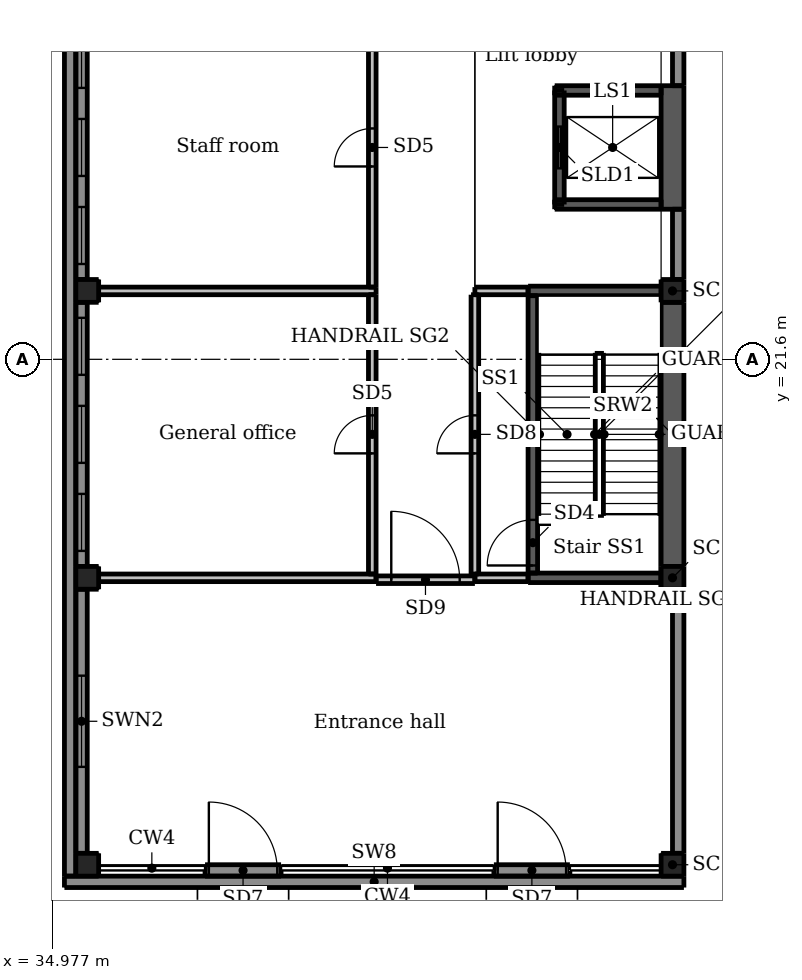
"""IFC4 building model, lengths in metres.
Left out: names, types, materials, properties, quantities, classifications, styles, units other than length and angle.
Written with IfcOpenShell. Run it as: python <this file> out.ifc"""

import sys

from ifc_helpers import new_model, si_unit, direction, frame, frame_2d, origin, origin_2d, place, context, subcontext, project, spatial, rectangle, extrude, element, fill, save


model = new_model("IFC4")
c1 = context("Model", 3, precision=1e-05, world=origin(), true_north=direction((0.0, 1.0)))
c2 = subcontext(c1, "Body", "Model", "MODEL_VIEW")
j1 = project(units=[si_unit("LENGTHUNIT", "METRE"), si_unit("PLANEANGLEUNIT", "RADIAN")], contexts=[c1])
p1 = place(None, origin())
s1 = spatial("IfcSite", under=j1, at=p1, CompositionType="ELEMENT")
p2 = place(p1, origin())
s2 = spatial("IfcBuilding", under=s1, at=p2, CompositionType="ELEMENT")
p3 = place(p2, origin())
s3 = spatial("IfcBuildingStorey", under=s2, at=p3, CompositionType="ELEMENT", Elevation=0.0)
p4 = place(p3, frame((52.0, 20.25, -2.5), z_axis=(0.0, 0.0, 1.0), x_axis=(1.0, 0.0, 0.0)))
e1 = element("IfcWall", 1, at=p4, inside=s3, PredefinedType="SOLIDWALL", context=c2, shape_type="SweptSolid", body=[
    extrude(rectangle(XDim=7.0, YDim=0.5, at=frame_2d((3.5, 0.0))), origin(), (0.0, 0.0, 1.0), 2.2),
])
for number, where, z_axis, x_axis in (
    (2, (35.9, 8.3, -0.3), (0.0, 0.0, 1.0), (1.0, 0.0, 0.0)),
    (3, (51.3, 8.3, -0.3), (0.0, 0.0, 1.0), (1.0, 0.0, 0.0)),
    (4, (35.9, 15.85, -0.3), (0.0, 0.0, 1.0), (1.0, 0.0, 0.0)),
    (5, (51.3, 15.85, -0.3), (0.0, 0.0, 1.0), (1.0, 0.0, 0.0)),
    (6, (35.9, 23.4, -0.3), (0.0, 0.0, 1.0), (1.0, 0.0, 0.0)),
    (7, (51.3, 23.4, -0.3), (0.0, 0.0, 1.0), (1.0, 0.0, 0.0)),
):
    element("IfcColumn", number, at=place(p3, frame(where, z_axis=z_axis, x_axis=x_axis)), inside=s3, PredefinedType="COLUMN", context=c2, shape_type="SweptSolid", body=[
        extrude(rectangle(XDim=0.6, YDim=0.6, at=origin_2d()), origin(), (0.0, 0.0, 1.0), 5.5),
    ])
p5 = place(p3, frame((47.625, 15.975, -0.3), z_axis=(0.0, 0.0, 1.0), x_axis=(0.0, 1.0, 0.0)))
e8 = element("IfcWall", 8, at=p5, inside=s3, PredefinedType="SHEAR", context=c2, shape_type="SweptSolid", body=[
    extrude(rectangle(XDim=7.3, YDim=0.25, at=frame_2d((3.65, 0.0))), origin(), (0.0, 0.0, 1.0), 5.5),
])
p6 = place(p5, frame((0.2, 0.0, 0.3)))
e9 = element("IfcOpeningElement", 9, at=p6, cuts=e8, PredefinedType="OPENING", context=c2, shape_type="SweptSolid", body=[
    extrude(rectangle(XDim=1.2, YDim=2.1, at=frame_2d((0.6, 1.05))), frame((0.0, 0.135, 0.0), z_axis=(0.0, -1.0, 0.0), x_axis=(1.0, 0.0, 0.0)), (0.0, 0.0, 1.0), 0.27),
])
for number, where, z_axis, x_axis in (
    (10, (47.5, 15.85, -0.3), (0.0, 0.0, 1.0), (1.0, 0.0, 0.0)),
    (11, (47.5, 23.4, -0.3), (0.0, 0.0, 1.0), (1.0, 0.0, 0.0)),
):
    element("IfcWall", number, at=place(p3, frame(where, z_axis=z_axis, x_axis=x_axis)), inside=s3, PredefinedType="SHEAR", context=c2, shape_type="SweptSolid", body=[
        extrude(rectangle(XDim=3.5, YDim=0.25, at=frame_2d((1.75, 0.0))), origin(), (0.0, 0.0, 1.0), 5.5),
    ])
p7 = place(p3, frame((51.3, 16.15, -0.3), z_axis=(0.0, 0.0, 1.0), x_axis=(0.0, 1.0, 0.0)))
e12 = element("IfcWall", 12, at=p7, inside=s3, PredefinedType="SHEAR", context=c2, shape_type="SweptSolid", body=[
    extrude(rectangle(XDim=6.95, YDim=0.6, at=frame_2d((3.475, 0.0))), origin(), (0.0, 0.0, 1.0), 5.5),
])
p8 = place(p3, frame((48.325, 25.675, -1.5), z_axis=(0.0, 0.0, 1.0), x_axis=(0.0, 1.0, 0.0)))
e13 = element("IfcWall", 13, at=p8, inside=s3, PredefinedType="SHEAR", context=c2, shape_type="SweptSolid", body=[
    extrude(rectangle(XDim=3.0, YDim=0.25, at=frame_2d((1.5, 0.0))), origin(), (0.0, 0.0, 1.0), 6.7),
])
p9 = place(p8, frame((0.95, 0.0, 1.5)))
e14 = element("IfcOpeningElement", 14, at=p9, cuts=e13, PredefinedType="OPENING", context=c2, shape_type="SweptSolid", body=[
    extrude(rectangle(XDim=1.1, YDim=2.1, at=frame_2d((0.55, 1.05))), frame((0.0, 0.135, 0.0), z_axis=(0.0, -1.0, 0.0), x_axis=(1.0, 0.0, 0.0)), (0.0, 0.0, 1.0), 0.27),
])
for number, where, z_axis, x_axis in (
    (15, (48.2, 25.675, -1.5), (0.0, 0.0, 1.0), (1.0, 0.0, 0.0)),
    (16, (48.2, 28.675, -1.5), (0.0, 0.0, 1.0), (1.0, 0.0, 0.0)),
):
    element("IfcWall", number, at=place(p3, frame(where, z_axis=z_axis, x_axis=x_axis)), inside=s3, PredefinedType="SHEAR", context=c2, shape_type="SweptSolid", body=[
        extrude(rectangle(XDim=2.8, YDim=0.25, at=frame_2d((1.4, 0.0))), origin(), (0.0, 0.0, 1.0), 6.7),
    ])
p10 = place(p3, frame((51.3, 25.55, -1.5), z_axis=(0.0, 0.0, 1.0), x_axis=(0.0, 1.0, 0.0)))
e17 = element("IfcWall", 17, at=p10, inside=s3, PredefinedType="SHEAR", context=c2, shape_type="SweptSolid", body=[
    extrude(rectangle(XDim=3.25, YDim=0.6, at=frame_2d((1.625, 0.0))), origin(), (0.0, 0.0, 1.0), 6.7),
])
p11 = place(p3, frame((52.125, 20.0, 0.0), z_axis=(0.0, 0.0, 1.0), x_axis=(0.0, 1.0, 0.0)))
e18 = element("IfcWall", 18, at=p11, inside=s3, PredefinedType="SOLIDWALL", context=c2, shape_type="SweptSolid", body=[
    extrude(rectangle(XDim=9.8, YDim=0.25, at=frame_2d((4.9, 0.0))), origin(), (0.0, 0.0, 1.0), 5.2),
])
p12 = place(p3, frame((35.75, 8.6, 0.0), z_axis=(0.0, 0.0, 1.0), x_axis=(0.0, 1.0, 0.0)))
e19 = element("IfcWall", 19, at=p12, inside=s3, PredefinedType="SOLIDWALL", context=c2, shape_type="SweptSolid", body=[
    extrude(rectangle(XDim=6.95, YDim=0.3, at=frame_2d((3.475, 0.0))), origin(), (0.0, 0.0, 1.0), 4.3),
])
p13 = place(p12, frame((2.275, 0.0, 0.9)))
e20 = element("IfcOpeningElement", 20, at=p13, cuts=e19, PredefinedType="OPENING", context=c2, shape_type="SweptSolid", body=[
    extrude(rectangle(XDim=2.4, YDim=1.5, at=frame_2d((1.2, 0.75))), frame((0.0, 0.16, 0.0), z_axis=(0.0, -1.0, 0.0), x_axis=(1.0, 0.0, 0.0)), (0.0, 0.0, 1.0), 0.32),
])
p14 = place(p3, frame((35.75, 16.15, 0.0), z_axis=(0.0, 0.0, 1.0), x_axis=(0.0, 1.0, 0.0)))
e21 = element("IfcWall", 21, at=p14, inside=s3, PredefinedType="SOLIDWALL", context=c2, shape_type="SweptSolid", body=[
    extrude(rectangle(XDim=6.95, YDim=0.3, at=frame_2d((3.475, 0.0))), origin(), (0.0, 0.0, 1.0), 4.3),
])
p15 = place(p14, frame((0.408, 0.0, 0.9)))
e22 = element("IfcOpeningElement", 22, at=p15, cuts=e21, PredefinedType="OPENING", context=c2, shape_type="SweptSolid", body=[
    extrude(rectangle(XDim=1.5, YDim=1.5, at=frame_2d((0.75, 0.75))), frame((0.0, 0.16, 0.0), z_axis=(0.0, -1.0, 0.0), x_axis=(1.0, 0.0, 0.0)), (0.0, 0.0, 1.0), 0.32),
])
p16 = place(p14, frame((2.725, 0.0, 0.9)))
e23 = element("IfcOpeningElement", 23, at=p16, cuts=e21, PredefinedType="OPENING", context=c2, shape_type="SweptSolid", body=[
    extrude(rectangle(XDim=1.5, YDim=1.5, at=frame_2d((0.75, 0.75))), frame((0.0, 0.16, 0.0), z_axis=(0.0, -1.0, 0.0), x_axis=(1.0, 0.0, 0.0)), (0.0, 0.0, 1.0), 0.32),
])
p17 = place(p14, frame((5.042, 0.0, 0.9)))
e24 = element("IfcOpeningElement", 24, at=p17, cuts=e21, PredefinedType="OPENING", context=c2, shape_type="SweptSolid", body=[
    extrude(rectangle(XDim=1.5, YDim=1.5, at=frame_2d((0.75, 0.75))), frame((0.0, 0.16, 0.0), z_axis=(0.0, -1.0, 0.0), x_axis=(1.0, 0.0, 0.0)), (0.0, 0.0, 1.0), 0.32),
])
p18 = place(p3, frame((35.75, 23.7, 0.0), z_axis=(0.0, 0.0, 1.0), x_axis=(0.0, 1.0, 0.0)))
e25 = element("IfcWall", 25, at=p18, inside=s3, PredefinedType="SOLIDWALL", context=c2, shape_type="SweptSolid", body=[
    extrude(rectangle(XDim=6.95, YDim=0.3, at=frame_2d((3.475, 0.0))), origin(), (0.0, 0.0, 1.0), 4.3),
])
p19 = place(p18, frame((0.408, 0.0, 0.9)))
e26 = element("IfcOpeningElement", 26, at=p19, cuts=e25, PredefinedType="OPENING", context=c2, shape_type="SweptSolid", body=[
    extrude(rectangle(XDim=1.5, YDim=1.5, at=frame_2d((0.75, 0.75))), frame((0.0, 0.16, 0.0), z_axis=(0.0, -1.0, 0.0), x_axis=(1.0, 0.0, 0.0)), (0.0, 0.0, 1.0), 0.32),
])
p20 = place(p18, frame((2.725, 0.0, 0.9)))
e27 = element("IfcOpeningElement", 27, at=p20, cuts=e25, PredefinedType="OPENING", context=c2, shape_type="SweptSolid", body=[
    extrude(rectangle(XDim=1.5, YDim=1.5, at=frame_2d((0.75, 0.75))), frame((0.0, 0.16, 0.0), z_axis=(0.0, -1.0, 0.0), x_axis=(1.0, 0.0, 0.0)), (0.0, 0.0, 1.0), 0.32),
])
p21 = place(p18, frame((5.042, 0.0, 0.9)))
e28 = element("IfcOpeningElement", 28, at=p21, cuts=e25, PredefinedType="OPENING", context=c2, shape_type="SweptSolid", body=[
    extrude(rectangle(XDim=1.5, YDim=1.5, at=frame_2d((0.75, 0.75))), frame((0.0, 0.16, 0.0), z_axis=(0.0, -1.0, 0.0), x_axis=(1.0, 0.0, 0.0)), (0.0, 0.0, 1.0), 0.32),
])
p22 = place(p3, frame((39.0, 8.15, 0.0), z_axis=(0.0, 0.0, 1.0), x_axis=(1.0, 0.0, 0.0)))
e29 = element("IfcWall", 29, at=p22, inside=s3, PredefinedType="SOLIDWALL", context=c2, shape_type="SweptSolid", body=[
    extrude(rectangle(XDim=2.0, YDim=0.3, at=frame_2d((1.0, 0.0))), origin(), (0.0, 0.0, 1.0), 4.1),
])
p23 = place(p22, frame((0.1, 0.0, 0.0)))
e30 = element("IfcOpeningElement", 30, at=p23, cuts=e29, PredefinedType="OPENING", context=c2, shape_type="SweptSolid", body=[
    extrude(rectangle(XDim=1.8, YDim=2.4, at=frame_2d((0.9, 1.2))), frame((0.0, 0.16, 0.0), z_axis=(0.0, -1.0, 0.0), x_axis=(1.0, 0.0, 0.0)), (0.0, 0.0, 1.0), 0.32),
])
p24 = place(p3, frame((46.6, 8.15, 0.0), z_axis=(0.0, 0.0, 1.0), x_axis=(1.0, 0.0, 0.0)))
e31 = element("IfcWall", 31, at=p24, inside=s3, PredefinedType="SOLIDWALL", context=c2, shape_type="SweptSolid", body=[
    extrude(rectangle(XDim=2.0, YDim=0.3, at=frame_2d((1.0, 0.0))), origin(), (0.0, 0.0, 1.0), 4.1),
])
p25 = place(p24, frame((0.1, 0.0, 0.0)))
e32 = element("IfcOpeningElement", 32, at=p25, cuts=e31, PredefinedType="OPENING", context=c2, shape_type="SweptSolid", body=[
    extrude(rectangle(XDim=1.8, YDim=2.4, at=frame_2d((0.9, 1.2))), frame((0.0, 0.16, 0.0), z_axis=(0.0, -1.0, 0.0), x_axis=(1.0, 0.0, 0.0)), (0.0, 0.0, 1.0), 0.32),
])
p26 = place(p3, frame((51.45, 8.6, 0.0), z_axis=(0.0, 0.0, 1.0), x_axis=(0.0, 1.0, 0.0)))
e33 = element("IfcWall", 33, at=p26, inside=s3, PredefinedType="SOLIDWALL", context=c2, shape_type="SweptSolid", body=[
    extrude(rectangle(XDim=6.95, YDim=0.3, at=frame_2d((3.475, 0.0))), origin(), (0.0, 0.0, 1.0), 4.3),
])
p27 = place(p3, frame((51.45, 23.7, 0.0), z_axis=(0.0, 0.0, 1.0), x_axis=(0.0, 1.0, 0.0)))
e34 = element("IfcWall", 34, at=p27, inside=s3, PredefinedType="SOLIDWALL", context=c2, shape_type="SweptSolid", body=[
    extrude(rectangle(XDim=1.85, YDim=0.3, at=frame_2d((0.925, 0.0))), origin(), (0.0, 0.0, 1.0), 4.3),
])
p28 = place(p3, frame((51.45, 28.8, 0.0), z_axis=(0.0, 0.0, 1.0), x_axis=(0.0, 1.0, 0.0)))
e35 = element("IfcWall", 35, at=p28, inside=s3, PredefinedType="SOLIDWALL", context=c2, shape_type="SweptSolid", body=[
    extrude(rectangle(XDim=1.85, YDim=0.3, at=frame_2d((0.925, 0.0))), origin(), (0.0, 0.0, 1.0), 4.3),
])
p29 = place(p3, frame((35.3, 7.85, -0.3), z_axis=(0.0, 0.0, 1.0), x_axis=(1.0, 0.0, 0.0)))
e36 = element("IfcWall", 36, at=p29, inside=s3, PredefinedType="SOLIDWALL", context=c2, shape_type="SweptSolid", body=[
    extrude(rectangle(XDim=16.3, YDim=0.3, at=frame_2d((8.15, 0.0))), origin(), (0.0, 0.0, 1.0), 0.3),
])
p30 = place(p3, frame((35.45, 8.0, -0.3), z_axis=(0.0, 0.0, 1.0), x_axis=(0.0, 1.0, 0.0)))
e37 = element("IfcWall", 37, at=p30, inside=s3, PredefinedType="SOLIDWALL", context=c2, shape_type="SweptSolid", body=[
    extrude(rectangle(XDim=76.4, YDim=0.3, at=frame_2d((38.2, 0.0))), origin(), (0.0, 0.0, 1.0), 0.3),
])
p31 = place(p3, frame((43.4, 15.95, 0.0), z_axis=(0.0, 0.0, 1.0), x_axis=(0.0, 1.0, 0.0)))
e38 = element("IfcWall", 38, at=p31, inside=s3, PredefinedType="PARTITIONING", context=c2, shape_type="SweptSolid", body=[
    extrude(rectangle(XDim=7.35, YDim=0.2, at=frame_2d((3.675, 0.0))), origin(), (0.0, 0.0, 1.0), 4.1),
])
p32 = place(p31, frame((3.175, 0.0, 0.0)))
e39 = element("IfcOpeningElement", 39, at=p32, cuts=e38, PredefinedType="OPENING", context=c2, shape_type="SweptSolid", body=[
    extrude(rectangle(XDim=1.0, YDim=2.1, at=frame_2d((0.5, 1.05))), frame((0.0, 0.11, 0.0), z_axis=(0.0, -1.0, 0.0), x_axis=(1.0, 0.0, 0.0)), (0.0, 0.0, 1.0), 0.22),
])
p33 = place(p3, frame((43.4, 23.5, 0.0), z_axis=(0.0, 0.0, 1.0), x_axis=(0.0, 1.0, 0.0)))
e40 = element("IfcWall", 40, at=p33, inside=s3, PredefinedType="PARTITIONING", context=c2, shape_type="SweptSolid", body=[
    extrude(rectangle(XDim=7.35, YDim=0.2, at=frame_2d((3.675, 0.0))), origin(), (0.0, 0.0, 1.0), 4.1),
])
p34 = place(p33, frame((3.175, 0.0, 0.0)))
e41 = element("IfcOpeningElement", 41, at=p34, cuts=e40, PredefinedType="OPENING", context=c2, shape_type="SweptSolid", body=[
    extrude(rectangle(XDim=1.0, YDim=2.1, at=frame_2d((0.5, 1.05))), frame((0.0, 0.11, 0.0), z_axis=(0.0, -1.0, 0.0), x_axis=(1.0, 0.0, 0.0)), (0.0, 0.0, 1.0), 0.22),
])
for number, where, z_axis, x_axis in (
    (42, (36.2, 15.85, 0.0), (0.0, 0.0, 1.0), (1.0, 0.0, 0.0)),
    (43, (36.2, 23.4, 0.0), (0.0, 0.0, 1.0), (1.0, 0.0, 0.0)),
):
    element("IfcWall", number, at=place(p3, frame(where, z_axis=z_axis, x_axis=x_axis)), inside=s3, PredefinedType="PARTITIONING", context=c2, shape_type="SweptSolid", body=[
        extrude(rectangle(XDim=7.3, YDim=0.2, at=frame_2d((3.65, 0.0))), origin(), (0.0, 0.0, 1.0), 4.1),
    ])
for number, where, z_axis, x_axis in (
    (44, (46.1, 15.85, 0.0), (0.0, 0.0, 1.0), (1.0, 0.0, 0.0)),
    (45, (46.1, 23.4, 0.0), (0.0, 0.0, 1.0), (1.0, 0.0, 0.0)),
):
    element("IfcWall", number, at=place(p3, frame(where, z_axis=z_axis, x_axis=x_axis)), inside=s3, PredefinedType="PARTITIONING", context=c2, shape_type="SweptSolid", body=[
        extrude(rectangle(XDim=1.4, YDim=0.2, at=frame_2d((0.7, 0.0))), origin(), (0.0, 0.0, 1.0), 4.1),
    ])
p35 = place(p3, frame((46.1, 15.95, 0.0), z_axis=(0.0, 0.0, 1.0), x_axis=(0.0, 1.0, 0.0)))
e46 = element("IfcWall", 46, at=p35, inside=s3, PredefinedType="PARTITIONING", context=c2, shape_type="SweptSolid", body=[
    extrude(rectangle(XDim=7.35, YDim=0.2, at=frame_2d((3.675, 0.0))), origin(), (0.0, 0.0, 1.0), 4.1),
])
p36 = place(p35, frame((3.175, 0.0, 0.0)))
e47 = element("IfcOpeningElement", 47, at=p36, cuts=e46, PredefinedType="OPENING", context=c2, shape_type="SweptSolid", body=[
    extrude(rectangle(XDim=1.0, YDim=2.1, at=frame_2d((0.5, 1.05))), frame((0.0, 0.11, 0.0), z_axis=(0.0, -1.0, 0.0), x_axis=(1.0, 0.0, 0.0)), (0.0, 0.0, 1.0), 0.22),
])
p37 = place(p3, frame((43.5, 15.8, 0.0), z_axis=(0.0, 0.0, 1.0), x_axis=(1.0, 0.0, 0.0)))
e48 = element("IfcWall", 48, at=p37, inside=s3, PredefinedType="PARTITIONING", context=c2, shape_type="SweptSolid", body=[
    extrude(rectangle(XDim=2.6, YDim=0.2, at=frame_2d((1.3, 0.0))), origin(), (0.0, 0.0, 1.0), 4.1),
])
p38 = place(p37, frame((0.4, 0.0, 0.0)))
e49 = element("IfcOpeningElement", 49, at=p38, cuts=e48, PredefinedType="OPENING", context=c2, shape_type="SweptSolid", body=[
    extrude(rectangle(XDim=1.8, YDim=2.1, at=frame_2d((0.9, 1.05))), frame((0.0, 0.11, 0.0), z_axis=(0.0, -1.0, 0.0), x_axis=(1.0, 0.0, 0.0)), (0.0, 0.0, 1.0), 0.22),
])
p39 = place(p13, origin())
e50 = element("IfcWindow", 50, at=p39, inside=s3, PartitioningType="TRIPLE_PANEL_VERTICAL", PredefinedType="WINDOW", context=c2, shape_type="SweptSolid", body=[
    extrude(rectangle(XDim=2.4, YDim=1.5, at=frame_2d((1.2, 0.75))), frame((0.0, 0.03, 0.0), z_axis=(0.0, -1.0, 0.0), x_axis=(1.0, 0.0, 0.0)), (0.0, 0.0, 1.0), 0.06),
])
fill(e20, e50)
p40 = place(p15, origin())
e51 = element("IfcWindow", 51, at=p40, inside=s3, PartitioningType="DOUBLE_PANEL_HORIZONTAL", PredefinedType="WINDOW", context=c2, shape_type="SweptSolid", body=[
    extrude(rectangle(XDim=1.5, YDim=1.5, at=frame_2d((0.75, 0.75))), frame((0.0, 0.03, 0.0), z_axis=(0.0, -1.0, 0.0), x_axis=(1.0, 0.0, 0.0)), (0.0, 0.0, 1.0), 0.06),
])
fill(e22, e51)
p41 = place(p16, origin())
e52 = element("IfcWindow", 52, at=p41, inside=s3, PartitioningType="DOUBLE_PANEL_HORIZONTAL", PredefinedType="WINDOW", context=c2, shape_type="SweptSolid", body=[
    extrude(rectangle(XDim=1.5, YDim=1.5, at=frame_2d((0.75, 0.75))), frame((0.0, 0.03, 0.0), z_axis=(0.0, -1.0, 0.0), x_axis=(1.0, 0.0, 0.0)), (0.0, 0.0, 1.0), 0.06),
])
fill(e23, e52)
p42 = place(p17, origin())
e53 = element("IfcWindow", 53, at=p42, inside=s3, PartitioningType="DOUBLE_PANEL_HORIZONTAL", PredefinedType="WINDOW", context=c2, shape_type="SweptSolid", body=[
    extrude(rectangle(XDim=1.5, YDim=1.5, at=frame_2d((0.75, 0.75))), frame((0.0, 0.03, 0.0), z_axis=(0.0, -1.0, 0.0), x_axis=(1.0, 0.0, 0.0)), (0.0, 0.0, 1.0), 0.06),
])
fill(e24, e53)
p43 = place(p19, origin())
e54 = element("IfcWindow", 54, at=p43, inside=s3, PartitioningType="DOUBLE_PANEL_HORIZONTAL", PredefinedType="WINDOW", context=c2, shape_type="SweptSolid", body=[
    extrude(rectangle(XDim=1.5, YDim=1.5, at=frame_2d((0.75, 0.75))), frame((0.0, 0.03, 0.0), z_axis=(0.0, -1.0, 0.0), x_axis=(1.0, 0.0, 0.0)), (0.0, 0.0, 1.0), 0.06),
])
fill(e26, e54)
p44 = place(p20, origin())
e55 = element("IfcWindow", 55, at=p44, inside=s3, PartitioningType="DOUBLE_PANEL_HORIZONTAL", PredefinedType="WINDOW", context=c2, shape_type="SweptSolid", body=[
    extrude(rectangle(XDim=1.5, YDim=1.5, at=frame_2d((0.75, 0.75))), frame((0.0, 0.03, 0.0), z_axis=(0.0, -1.0, 0.0), x_axis=(1.0, 0.0, 0.0)), (0.0, 0.0, 1.0), 0.06),
])
fill(e27, e55)
p45 = place(p21, origin())
e56 = element("IfcWindow", 56, at=p45, inside=s3, PartitioningType="DOUBLE_PANEL_HORIZONTAL", PredefinedType="WINDOW", context=c2, shape_type="SweptSolid", body=[
    extrude(rectangle(XDim=1.5, YDim=1.5, at=frame_2d((0.75, 0.75))), frame((0.0, 0.03, 0.0), z_axis=(0.0, -1.0, 0.0), x_axis=(1.0, 0.0, 0.0)), (0.0, 0.0, 1.0), 0.06),
])
fill(e28, e56)
p46 = place(p23, origin())
e57 = element("IfcDoor", 57, at=p46, inside=s3, OperationType="DOUBLE_DOOR_SINGLE_SWING", PredefinedType="DOOR", context=c2, shape_type="SweptSolid", body=[
    extrude(rectangle(XDim=1.8, YDim=2.4, at=frame_2d((0.9, 1.2))), frame((0.0, 0.025, 0.0), z_axis=(0.0, -1.0, 0.0), x_axis=(1.0, 0.0, 0.0)), (0.0, 0.0, 1.0), 0.05),
])
fill(e30, e57)
p47 = place(p25, origin())
e58 = element("IfcDoor", 58, at=p47, inside=s3, OperationType="DOUBLE_DOOR_SINGLE_SWING", PredefinedType="DOOR", context=c2, shape_type="SweptSolid", body=[
    extrude(rectangle(XDim=1.8, YDim=2.4, at=frame_2d((0.9, 1.2))), frame((0.0, 0.025, 0.0), z_axis=(0.0, -1.0, 0.0), x_axis=(1.0, 0.0, 0.0)), (0.0, 0.0, 1.0), 0.05),
])
fill(e32, e58)
p48 = place(p32, origin())
e59 = element("IfcDoor", 59, at=p48, inside=s3, OperationType="SINGLE_SWING_LEFT", PredefinedType="DOOR", context=c2, shape_type="SweptSolid", body=[
    extrude(rectangle(XDim=1.0, YDim=2.1, at=frame_2d((0.5, 1.05))), frame((0.0, 0.025, 0.0), z_axis=(0.0, -1.0, 0.0), x_axis=(1.0, 0.0, 0.0)), (0.0, 0.0, 1.0), 0.05),
])
fill(e39, e59)
p49 = place(p34, origin())
e60 = element("IfcDoor", 60, at=p49, inside=s3, OperationType="SINGLE_SWING_LEFT", PredefinedType="DOOR", context=c2, shape_type="SweptSolid", body=[
    extrude(rectangle(XDim=1.0, YDim=2.1, at=frame_2d((0.5, 1.05))), frame((0.0, 0.025, 0.0), z_axis=(0.0, -1.0, 0.0), x_axis=(1.0, 0.0, 0.0)), (0.0, 0.0, 1.0), 0.05),
])
fill(e41, e60)
p50 = place(p36, origin())
e61 = element("IfcDoor", 61, at=p50, inside=s3, OperationType="SINGLE_SWING_LEFT", PredefinedType="DOOR", context=c2, shape_type="SweptSolid", body=[
    extrude(rectangle(XDim=1.0, YDim=2.1, at=frame_2d((0.5, 1.05))), frame((0.0, 0.025, 0.0), z_axis=(0.0, -1.0, 0.0), x_axis=(1.0, 0.0, 0.0)), (0.0, 0.0, 1.0), 0.05),
])
fill(e47, e61)
p51 = place(p38, origin())
e62 = element("IfcDoor", 62, at=p51, inside=s3, OperationType="DOUBLE_DOOR_SINGLE_SWING", PredefinedType="DOOR", context=c2, shape_type="SweptSolid", body=[
    extrude(rectangle(XDim=1.8, YDim=2.1, at=frame_2d((0.9, 1.05))), frame((0.0, 0.025, 0.0), z_axis=(0.0, -1.0, 0.0), x_axis=(1.0, 0.0, 0.0)), (0.0, 0.0, 1.0), 0.05),
])
fill(e49, e62)
p52 = place(p6, origin())
e63 = element("IfcDoor", 63, at=p52, inside=s3, OperationType="SINGLE_SWING_LEFT", PredefinedType="DOOR", context=c2, shape_type="SweptSolid", body=[
    extrude(rectangle(XDim=1.2, YDim=2.1, at=frame_2d((0.6, 1.05))), frame((0.0, 0.025, 0.0), z_axis=(0.0, -1.0, 0.0), x_axis=(1.0, 0.0, 0.0)), (0.0, 0.0, 1.0), 0.05),
])
fill(e9, e63)
p53 = place(p9, origin())
e64 = element("IfcDoor", 64, at=p53, inside=s3, OperationType="SLIDING_TO_LEFT", PredefinedType="DOOR", context=c2, shape_type="SweptSolid", body=[
    extrude(rectangle(XDim=1.1, YDim=2.1, at=frame_2d((0.55, 1.05))), frame((0.0, 0.025, 0.0), z_axis=(0.0, -1.0, 0.0), x_axis=(1.0, 0.0, 0.0)), (0.0, 0.0, 1.0), 0.05),
])
fill(e14, e64)
save(model, sys.argv[1])
